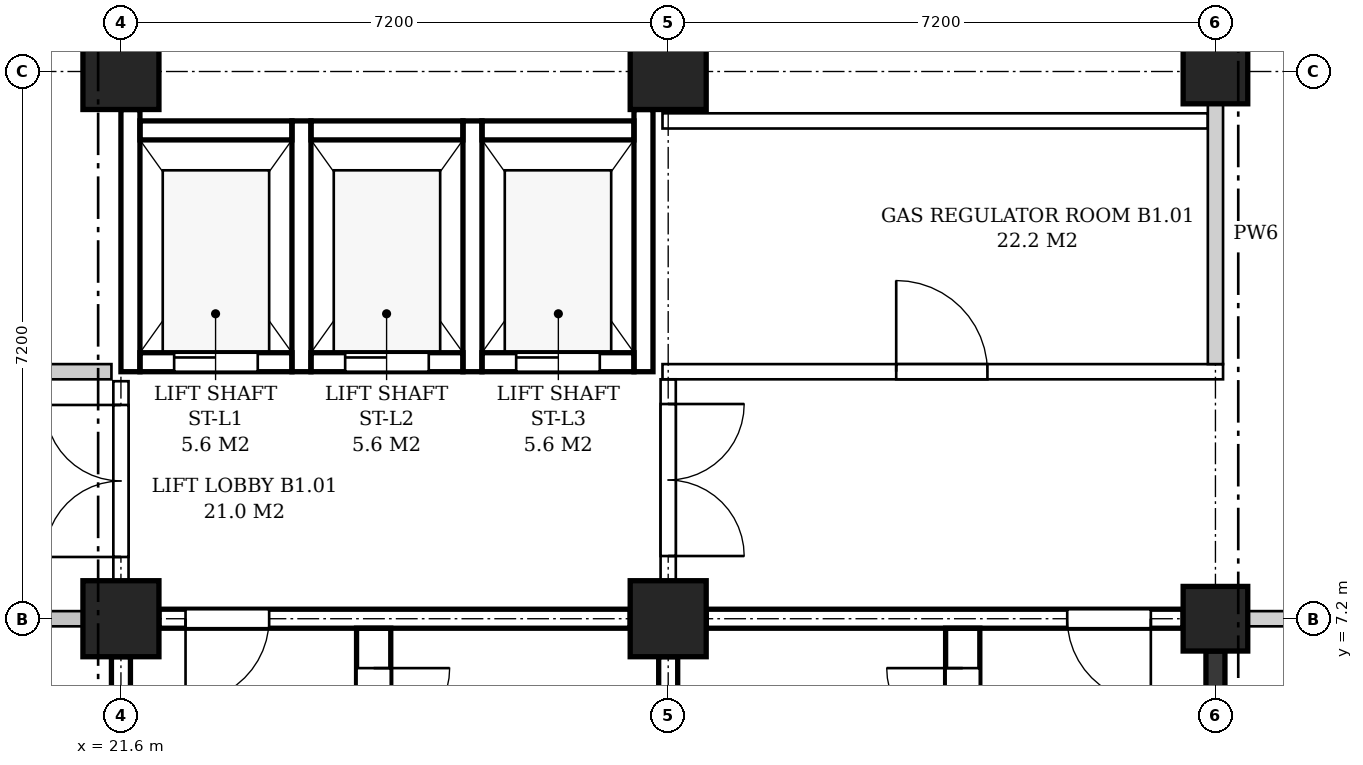
"""IFC4 building model, lengths in metres.
Left out: names, types, materials, properties, quantities, classifications, styles, units other than length and angle.
Written with IfcOpenShell. Run it as: python <this file> out.ifc"""

import sys

from ifc_helpers import new_model, si_unit, direction, frame, frame_2d, origin, origin_2d, place, context, subcontext, project, spatial, polyline, rectangle, outline, extrude, element, fill, save


model = new_model("IFC4")
c1 = context("Model", 3, precision=1e-05, world=origin(), true_north=direction((0.0, 1.0)))
c2 = subcontext(c1, "Body", "Model", "MODEL_VIEW")
j1 = project(units=[si_unit("LENGTHUNIT", "METRE"), si_unit("PLANEANGLEUNIT", "RADIAN")], contexts=[c1])
p1 = place(None, origin())
s1 = spatial("IfcSite", under=j1, at=p1, CompositionType="ELEMENT")
p2 = place(p1, origin())
s2 = spatial("IfcBuilding", under=s1, at=p2, CompositionType="ELEMENT")
p3 = place(p2, frame((0.0, 0.0, -4.5)))
s3 = spatial("IfcBuildingStorey", under=s2, at=p3, CompositionType="ELEMENT", Elevation=-4.5)
for number, where, z_axis, x_axis in (
    (1, (21.6, 7.2, 0.0), (0.0, 0.0, 1.0), (1.0, 0.0, 0.0)),
    (2, (21.6, 14.4, 0.0), (0.0, 0.0, 1.0), (1.0, 0.0, 0.0)),
    (3, (28.8, 7.2, 0.0), (0.0, 0.0, 1.0), (1.0, 0.0, 0.0)),
    (4, (28.8, 14.4, 0.0), (0.0, 0.0, 1.0), (1.0, 0.0, 0.0)),
):
    element("IfcColumn", number, at=place(p3, frame(where, z_axis=z_axis, x_axis=x_axis)), inside=s3, PredefinedType="COLUMN", context=c2, shape_type="SweptSolid", body=[
        extrude(rectangle(XDim=1.0, YDim=1.0, at=origin_2d()), origin(), (0.0, 0.0, 1.0), 4.5),
    ])
for number, where, z_axis, x_axis in (
    (5, (36.0, 7.2, 0.0), (0.0, 0.0, 1.0), (1.0, 0.0, 0.0)),
    (6, (36.0, 14.4, 0.0), (0.0, 0.0, 1.0), (1.0, 0.0, 0.0)),
):
    element("IfcColumn", number, at=place(p3, frame(where, z_axis=z_axis, x_axis=x_axis)), inside=s3, PredefinedType="COLUMN", context=c2, shape_type="SweptSolid", body=[
        extrude(rectangle(XDim=0.85, YDim=0.85, at=origin_2d()), origin(), (0.0, 0.0, 1.0), 4.5),
    ])
p4 = place(p3, frame((29.3, 7.2, 0.0), z_axis=(0.0, 0.0, 1.0), x_axis=(1.0, 0.0, 0.0)))
e7 = element("IfcWall", 7, at=p4, inside=s3, PredefinedType="SHEAR", context=c2, shape_type="SweptSolid", body=[
    extrude(rectangle(XDim=6.275, YDim=0.25, at=frame_2d((3.137, 0.0))), origin(), (0.0, 0.0, 1.0), 3.4),
])
p5 = place(p4, frame((4.75, 0.0, 0.0)))
e8 = element("IfcOpeningElement", 8, at=p5, cuts=e7, PredefinedType="OPENING", context=c2, shape_type="SweptSolid", body=[
    extrude(rectangle(XDim=1.1, YDim=2.1, at=frame_2d((0.55, 1.05))), frame((0.0, 0.135, 0.0), z_axis=(0.0, -1.0, 0.0), x_axis=(1.0, 0.0, 0.0)), (0.0, 0.0, 1.0), 0.27),
])
p6 = place(p3, frame((28.8, 0.5, 0.0), z_axis=(0.0, 0.0, 1.0), x_axis=(0.0, 1.0, 0.0)))
e9 = element("IfcWall", 9, at=p6, inside=s3, PredefinedType="SHEAR", context=c2, shape_type="SweptSolid", body=[
    extrude(rectangle(XDim=6.2, YDim=0.25, at=frame_2d((3.1, 0.0))), origin(), (0.0, 0.0, 1.0), 3.4),
])
p7 = place(p3, frame((36.0, 0.425, 0.0), z_axis=(0.0, 0.0, 1.0), x_axis=(0.0, 1.0, 0.0)))
e10 = element("IfcWall", 10, at=p7, inside=s3, PredefinedType="SHEAR", context=c2, shape_type="SweptSolid", body=[
    extrude(rectangle(XDim=6.35, YDim=0.25, at=frame_2d((3.175, 0.0))), origin(), (0.0, 0.0, 1.0), 3.4),
])
p8 = place(p3, frame((32.675, 0.2, 0.0), z_axis=(0.0, 0.0, 1.0), x_axis=(0.0, 1.0, 0.0)))
e11 = element("IfcWall", 11, at=p8, inside=s3, PredefinedType="SHEAR", context=c2, shape_type="SweptSolid", body=[
    extrude(rectangle(XDim=6.875, YDim=0.45, at=frame_2d((3.438, 0.0))), origin(), (0.0, 0.0, 1.0), 4.2),
])
p9 = place(p8, frame((5.35, 0.0, 0.0)))
e12 = element("IfcOpeningElement", 12, at=p9, cuts=e11, PredefinedType="OPENING", context=c2, shape_type="SweptSolid", body=[
    extrude(rectangle(XDim=1.0, YDim=2.1, at=frame_2d((0.5, 1.05))), frame((0.0, 0.235, 0.0), z_axis=(0.0, -1.0, 0.0), x_axis=(1.0, 0.0, 0.0)), (0.0, 0.0, 1.0), 0.47),
])
p10 = place(p3, frame((22.1, 7.2, 0.0), z_axis=(0.0, 0.0, 1.0), x_axis=(1.0, 0.0, 0.0)))
e13 = element("IfcWall", 13, at=p10, inside=s3, PredefinedType="SHEAR", context=c2, shape_type="SweptSolid", body=[
    extrude(rectangle(XDim=6.2, YDim=0.25, at=frame_2d((3.1, 0.0))), origin(), (0.0, 0.0, 1.0), 3.4),
])
p11 = place(p10, frame((0.35, 0.0, 0.0)))
e14 = element("IfcOpeningElement", 14, at=p11, cuts=e13, PredefinedType="OPENING", context=c2, shape_type="SweptSolid", body=[
    extrude(rectangle(XDim=1.1, YDim=2.1, at=frame_2d((0.55, 1.05))), frame((0.0, 0.135, 0.0), z_axis=(0.0, -1.0, 0.0), x_axis=(1.0, 0.0, 0.0)), (0.0, 0.0, 1.0), 0.27),
])
p12 = place(p3, frame((21.6, 0.5, 0.0), z_axis=(0.0, 0.0, 1.0), x_axis=(0.0, 1.0, 0.0)))
e15 = element("IfcWall", 15, at=p12, inside=s3, PredefinedType="SHEAR", context=c2, shape_type="SweptSolid", body=[
    extrude(rectangle(XDim=6.2, YDim=0.25, at=frame_2d((3.1, 0.0))), origin(), (0.0, 0.0, 1.0), 3.4),
])
p13 = place(p3, frame((24.925, 0.2, 0.0), z_axis=(0.0, 0.0, 1.0), x_axis=(0.0, 1.0, 0.0)))
e16 = element("IfcWall", 16, at=p13, inside=s3, PredefinedType="SHEAR", context=c2, shape_type="SweptSolid", body=[
    extrude(rectangle(XDim=6.875, YDim=0.45, at=frame_2d((3.438, 0.0))), origin(), (0.0, 0.0, 1.0), 4.2),
])
p14 = place(p13, frame((5.35, 0.0, 0.0)))
e17 = element("IfcOpeningElement", 17, at=p14, cuts=e16, PredefinedType="OPENING", context=c2, shape_type="SweptSolid", body=[
    extrude(rectangle(XDim=1.0, YDim=2.1, at=frame_2d((0.5, 1.05))), frame((0.0, 0.235, 0.0), z_axis=(0.0, -1.0, 0.0), x_axis=(1.0, 0.0, 0.0)), (0.0, 0.0, 1.0), 0.47),
])
p15 = place(p3, frame((21.725, 10.45, -1.6), z_axis=(0.0, 0.0, 1.0), x_axis=(0.0, 1.0, 0.0)))
e18 = element("IfcWall", 18, at=p15, inside=s3, PredefinedType="SHEAR", context=c2, shape_type="SweptSolid", body=[
    extrude(rectangle(XDim=3.45, YDim=0.25, at=frame_2d((1.725, 0.0))), origin(), (0.0, 0.0, 1.0), 5.0),
])
for number, where, z_axis, x_axis in (
    (19, (23.975, 10.45, -1.6), (0.0, 0.0, 1.0), (0.0, 1.0, 0.0)),
    (20, (26.225, 10.45, -1.6), (0.0, 0.0, 1.0), (0.0, 1.0, 0.0)),
):
    element("IfcWall", number, at=place(p3, frame(where, z_axis=z_axis, x_axis=x_axis)), inside=s3, PredefinedType="SHEAR", context=c2, shape_type="SweptSolid", body=[
        extrude(rectangle(XDim=3.3, YDim=0.25, at=frame_2d((1.65, 0.0))), origin(), (0.0, 0.0, 1.0), 5.8),
    ])
p16 = place(p3, frame((28.475, 10.45, -1.6), z_axis=(0.0, 0.0, 1.0), x_axis=(0.0, 1.0, 0.0)))
e21 = element("IfcWall", 21, at=p16, inside=s3, PredefinedType="SHEAR", context=c2, shape_type="SweptSolid", body=[
    extrude(rectangle(XDim=3.45, YDim=0.25, at=frame_2d((1.725, 0.0))), origin(), (0.0, 0.0, 1.0), 5.8),
])
p17 = place(p3, frame((21.85, 10.575, 0.0), z_axis=(0.0, 0.0, 1.0), x_axis=(1.0, 0.0, 0.0)))
e22 = element("IfcWall", 22, at=p17, inside=s3, PredefinedType="SHEAR", context=c2, shape_type="SweptSolid", body=[
    extrude(rectangle(XDim=2.0, YDim=0.25, at=frame_2d((1.0, 0.0))), origin(), (0.0, 0.0, 1.0), 4.2),
])
p18 = place(p17, frame((0.45, 0.0, 0.0)))
e23 = element("IfcOpeningElement", 23, at=p18, cuts=e22, PredefinedType="OPENING", context=c2, shape_type="SweptSolid", body=[
    extrude(rectangle(XDim=1.1, YDim=2.1, at=frame_2d((0.55, 1.05))), frame((0.0, 0.135, 0.0), z_axis=(0.0, -1.0, 0.0), x_axis=(1.0, 0.0, 0.0)), (0.0, 0.0, 1.0), 0.27),
])
p19 = place(p3, frame((21.85, 13.625, -1.6), z_axis=(0.0, 0.0, 1.0), x_axis=(1.0, 0.0, 0.0)))
e24 = element("IfcWall", 24, at=p19, inside=s3, PredefinedType="SHEAR", context=c2, shape_type="SweptSolid", body=[
    extrude(rectangle(XDim=2.0, YDim=0.25, at=frame_2d((1.0, 0.0))), origin(), (0.0, 0.0, 1.0), 5.8),
])
p20 = place(p3, frame((24.1, 10.575, 0.0), z_axis=(0.0, 0.0, 1.0), x_axis=(1.0, 0.0, 0.0)))
e25 = element("IfcWall", 25, at=p20, inside=s3, PredefinedType="SHEAR", context=c2, shape_type="SweptSolid", body=[
    extrude(rectangle(XDim=2.0, YDim=0.25, at=frame_2d((1.0, 0.0))), origin(), (0.0, 0.0, 1.0), 4.2),
])
p21 = place(p20, frame((0.45, 0.0, 0.0)))
e26 = element("IfcOpeningElement", 26, at=p21, cuts=e25, PredefinedType="OPENING", context=c2, shape_type="SweptSolid", body=[
    extrude(rectangle(XDim=1.1, YDim=2.1, at=frame_2d((0.55, 1.05))), frame((0.0, 0.135, 0.0), z_axis=(0.0, -1.0, 0.0), x_axis=(1.0, 0.0, 0.0)), (0.0, 0.0, 1.0), 0.27),
])
p22 = place(p3, frame((24.1, 13.625, -1.6), z_axis=(0.0, 0.0, 1.0), x_axis=(1.0, 0.0, 0.0)))
e27 = element("IfcWall", 27, at=p22, inside=s3, PredefinedType="SHEAR", context=c2, shape_type="SweptSolid", body=[
    extrude(rectangle(XDim=2.0, YDim=0.25, at=frame_2d((1.0, 0.0))), origin(), (0.0, 0.0, 1.0), 5.8),
])
p23 = place(p3, frame((26.35, 10.575, 0.0), z_axis=(0.0, 0.0, 1.0), x_axis=(1.0, 0.0, 0.0)))
e28 = element("IfcWall", 28, at=p23, inside=s3, PredefinedType="SHEAR", context=c2, shape_type="SweptSolid", body=[
    extrude(rectangle(XDim=2.0, YDim=0.25, at=frame_2d((1.0, 0.0))), origin(), (0.0, 0.0, 1.0), 4.2),
])
p24 = place(p23, frame((0.45, 0.0, 0.0)))
e29 = element("IfcOpeningElement", 29, at=p24, cuts=e28, PredefinedType="OPENING", context=c2, shape_type="SweptSolid", body=[
    extrude(rectangle(XDim=1.1, YDim=2.1, at=frame_2d((0.55, 1.05))), frame((0.0, 0.135, 0.0), z_axis=(0.0, -1.0, 0.0), x_axis=(1.0, 0.0, 0.0)), (0.0, 0.0, 1.0), 0.27),
])
p25 = place(p3, frame((26.35, 13.625, -1.6), z_axis=(0.0, 0.0, 1.0), x_axis=(1.0, 0.0, 0.0)))
e30 = element("IfcWall", 30, at=p25, inside=s3, PredefinedType="SHEAR", context=c2, shape_type="SweptSolid", body=[
    extrude(rectangle(XDim=2.0, YDim=0.25, at=frame_2d((1.0, 0.0))), origin(), (0.0, 0.0, 1.0), 5.8),
])
p26 = place(p3, frame((14.9, 7.2, 0.0), z_axis=(0.0, 0.0, 1.0), x_axis=(1.0, 0.0, 0.0)))
e31 = element("IfcWall", 31, at=p26, inside=s3, PredefinedType="PARTITIONING", context=c2, shape_type="SweptSolid", body=[
    extrude(rectangle(XDim=6.2, YDim=0.2, at=frame_2d((3.1, 0.0))), origin(), (0.0, 0.0, 1.0), 3.4),
])
p27 = place(p26, frame((2.6, 0.0, 0.0)))
e32 = element("IfcOpeningElement", 32, at=p27, cuts=e31, PredefinedType="OPENING", context=c2, shape_type="SweptSolid", body=[
    extrude(rectangle(XDim=1.0, YDim=2.1, at=frame_2d((0.5, 1.05))), frame((0.0, 0.11, 0.0), z_axis=(0.0, -1.0, 0.0), x_axis=(1.0, 0.0, 0.0)), (0.0, 0.0, 1.0), 0.22),
])
p28 = place(p3, frame((36.425, 7.2, 0.0), z_axis=(0.0, 0.0, 1.0), x_axis=(1.0, 0.0, 0.0)))
e33 = element("IfcWall", 33, at=p28, inside=s3, PredefinedType="PARTITIONING", context=c2, shape_type="SweptSolid", body=[
    extrude(rectangle(XDim=6.35, YDim=0.2, at=frame_2d((3.175, 0.0))), origin(), (0.0, 0.0, 1.0), 3.4),
])
p29 = place(p3, frame((14.4, 10.45, 0.0), z_axis=(0.0, 0.0, 1.0), x_axis=(1.0, 0.0, 0.0)))
e34 = element("IfcWall", 34, at=p29, inside=s3, PredefinedType="SOLIDWALL", context=c2, shape_type="SweptSolid", body=[
    extrude(outline(polyline([(0.0, 0.0), (7.075, 0.0), (7.075, 3.4), (6.9, 3.4), (6.9, 4.2), (0.3, 4.2), (0.3, 3.4), (0.0, 3.4), (0.0, 0.0)])), frame((0.0, 0.1, 0.0), z_axis=(0.0, -1.0, 0.0), x_axis=(1.0, 0.0, 0.0)), (0.0, 0.0, 1.0), 0.2),
])
p30 = place(p29, frame((3.088, 0.0, 0.0)))
e35 = element("IfcOpeningElement", 35, at=p30, cuts=e34, PredefinedType="OPENING", context=c2, shape_type="SweptSolid", body=[
    extrude(rectangle(XDim=0.9, YDim=2.1, at=frame_2d((0.45, 1.05))), frame((0.0, 0.11, 0.0), z_axis=(0.0, -1.0, 0.0), x_axis=(1.0, 0.0, 0.0)), (0.0, 0.0, 1.0), 0.22),
])
p31 = place(p3, frame((28.725, 10.45, 0.0), z_axis=(0.0, 0.0, 1.0), x_axis=(1.0, 0.0, 0.0)))
e36 = element("IfcWall", 36, at=p31, inside=s3, PredefinedType="PARTITIONING", context=c2, shape_type="SweptSolid", body=[
    extrude(outline(polyline([(0.0, 0.0), (7.375, 0.0), (7.375, 3.4), (6.975, 3.4), (6.975, 4.2), (0.375, 4.2), (0.375, 3.4), (0.0, 3.4), (0.0, 0.0)])), frame((0.0, 0.1, 0.0), z_axis=(0.0, -1.0, 0.0), x_axis=(1.0, 0.0, 0.0)), (0.0, 0.0, 1.0), 0.2),
])
p32 = place(p31, frame((3.075, 0.0, 0.0)))
e37 = element("IfcOpeningElement", 37, at=p32, cuts=e36, PredefinedType="OPENING", context=c2, shape_type="SweptSolid", body=[
    extrude(rectangle(XDim=1.2, YDim=2.1, at=frame_2d((0.6, 1.05))), frame((0.0, 0.11, 0.0), z_axis=(0.0, -1.0, 0.0), x_axis=(1.0, 0.0, 0.0)), (0.0, 0.0, 1.0), 0.22),
])
p33 = place(p3, frame((28.725, 13.75, 0.0), z_axis=(0.0, 0.0, 1.0), x_axis=(1.0, 0.0, 0.0)))
e38 = element("IfcWall", 38, at=p33, inside=s3, PredefinedType="PARTITIONING", context=c2, shape_type="SweptSolid", body=[
    extrude(outline(polyline([(0.0, 0.0), (7.175, 0.0), (7.175, 3.4), (6.975, 3.4), (6.975, 4.2), (0.375, 4.2), (0.375, 3.4), (0.0, 3.4), (0.0, 0.0)])), frame((0.0, 0.1, 0.0), z_axis=(0.0, -1.0, 0.0), x_axis=(1.0, 0.0, 0.0)), (0.0, 0.0, 1.0), 0.2),
])
p34 = place(p3, frame((21.6, 7.7, 0.0), z_axis=(0.0, 0.0, 1.0), x_axis=(0.0, 1.0, 0.0)))
e39 = element("IfcWall", 39, at=p34, inside=s3, PredefinedType="PARTITIONING", context=c2, shape_type="SweptSolid", body=[
    extrude(rectangle(XDim=2.625, YDim=0.2, at=frame_2d((1.312, 0.0))), origin(), (0.0, 0.0, 1.0), 3.4),
])
p35 = place(p34, frame((0.312, 0.0, 0.0)))
e40 = element("IfcOpeningElement", 40, at=p35, cuts=e39, PredefinedType="OPENING", context=c2, shape_type="SweptSolid", body=[
    extrude(rectangle(XDim=2.0, YDim=2.4, at=frame_2d((1.0, 1.2))), frame((0.0, 0.11, 0.0), z_axis=(0.0, -1.0, 0.0), x_axis=(1.0, 0.0, 0.0)), (0.0, 0.0, 1.0), 0.22),
])
p36 = place(p3, frame((28.8, 7.7, 0.0), z_axis=(0.0, 0.0, 1.0), x_axis=(0.0, 1.0, 0.0)))
e41 = element("IfcWall", 41, at=p36, inside=s3, PredefinedType="PARTITIONING", context=c2, shape_type="SweptSolid", body=[
    extrude(rectangle(XDim=2.65, YDim=0.2, at=frame_2d((1.325, 0.0))), origin(), (0.0, 0.0, 1.0), 3.4),
])
p37 = place(p36, frame((0.325, 0.0, 0.0)))
e42 = element("IfcOpeningElement", 42, at=p37, cuts=e41, PredefinedType="OPENING", context=c2, shape_type="SweptSolid", body=[
    extrude(rectangle(XDim=2.0, YDim=2.4, at=frame_2d((1.0, 1.2))), frame((0.0, 0.11, 0.0), z_axis=(0.0, -1.0, 0.0), x_axis=(1.0, 0.0, 0.0)), (0.0, 0.0, 1.0), 0.22),
])
p38 = place(p3, frame((36.0, 10.55, 0.0), z_axis=(0.0, 0.0, 1.0), x_axis=(0.0, 1.0, 0.0)))
e43 = element("IfcWall", 43, at=p38, inside=s3, PredefinedType="PARTITIONING", context=c2, shape_type="SweptSolid", body=[
    extrude(rectangle(XDim=3.425, YDim=0.2, at=frame_2d((1.712, 0.0))), origin(), (0.0, 0.0, 1.0), 3.4),
])
p39 = place(p9, origin())
e44 = element("IfcDoor", 44, at=p39, inside=s3, OperationType="SINGLE_SWING_RIGHT", PredefinedType="DOOR", context=c2, shape_type="SweptSolid", body=[
    extrude(rectangle(XDim=1.0, YDim=2.1, at=frame_2d((0.5, 1.05))), frame((0.0, 0.025, 0.0), z_axis=(0.0, -1.0, 0.0), x_axis=(1.0, 0.0, 0.0)), (0.0, 0.0, 1.0), 0.05),
])
fill(e12, e44)
p40 = place(p5, frame((1.1, 0.0, 0.0), z_axis=(0.0, 0.0, 1.0), x_axis=(-1.0, 0.0, 0.0)))
e45 = element("IfcDoor", 45, at=p40, inside=s3, OperationType="SINGLE_SWING_LEFT", PredefinedType="DOOR", context=c2, shape_type="SweptSolid", body=[
    extrude(rectangle(XDim=1.1, YDim=2.1, at=frame_2d((0.55, 1.05))), frame((0.0, 0.025, 0.0), z_axis=(0.0, -1.0, 0.0), x_axis=(1.0, 0.0, 0.0)), (0.0, 0.0, 1.0), 0.05),
])
fill(e8, e45)
p41 = place(p14, frame((1.0, 0.0, 0.0), z_axis=(0.0, 0.0, 1.0), x_axis=(-1.0, 0.0, 0.0)))
e46 = element("IfcDoor", 46, at=p41, inside=s3, OperationType="SINGLE_SWING_LEFT", PredefinedType="DOOR", context=c2, shape_type="SweptSolid", body=[
    extrude(rectangle(XDim=1.0, YDim=2.1, at=frame_2d((0.5, 1.05))), frame((0.0, 0.025, 0.0), z_axis=(0.0, -1.0, 0.0), x_axis=(1.0, 0.0, 0.0)), (0.0, 0.0, 1.0), 0.05),
])
fill(e17, e46)
p42 = place(p11, frame((1.1, 0.0, 0.0), z_axis=(0.0, 0.0, 1.0), x_axis=(-1.0, 0.0, 0.0)))
e47 = element("IfcDoor", 47, at=p42, inside=s3, OperationType="SINGLE_SWING_RIGHT", PredefinedType="DOOR", context=c2, shape_type="SweptSolid", body=[
    extrude(rectangle(XDim=1.1, YDim=2.1, at=frame_2d((0.55, 1.05))), frame((0.0, 0.025, 0.0), z_axis=(0.0, -1.0, 0.0), x_axis=(1.0, 0.0, 0.0)), (0.0, 0.0, 1.0), 0.05),
])
fill(e14, e47)
p43 = place(p18, origin())
e48 = element("IfcDoor", 48, at=p43, inside=s3, OperationType="SLIDING_TO_LEFT", PredefinedType="DOOR", context=c2, shape_type="SweptSolid", body=[
    extrude(rectangle(XDim=1.1, YDim=2.1, at=frame_2d((0.55, 1.05))), frame((0.0, 0.025, 0.0), z_axis=(0.0, -1.0, 0.0), x_axis=(1.0, 0.0, 0.0)), (0.0, 0.0, 1.0), 0.05),
])
fill(e23, e48)
p44 = place(p21, origin())
e49 = element("IfcDoor", 49, at=p44, inside=s3, OperationType="SLIDING_TO_LEFT", PredefinedType="DOOR", context=c2, shape_type="SweptSolid", body=[
    extrude(rectangle(XDim=1.1, YDim=2.1, at=frame_2d((0.55, 1.05))), frame((0.0, 0.025, 0.0), z_axis=(0.0, -1.0, 0.0), x_axis=(1.0, 0.0, 0.0)), (0.0, 0.0, 1.0), 0.05),
])
fill(e26, e49)
p45 = place(p24, origin())
e50 = element("IfcDoor", 50, at=p45, inside=s3, OperationType="SLIDING_TO_LEFT", PredefinedType="DOOR", context=c2, shape_type="SweptSolid", body=[
    extrude(rectangle(XDim=1.1, YDim=2.1, at=frame_2d((0.55, 1.05))), frame((0.0, 0.025, 0.0), z_axis=(0.0, -1.0, 0.0), x_axis=(1.0, 0.0, 0.0)), (0.0, 0.0, 1.0), 0.05),
])
fill(e29, e50)
p46 = place(p35, origin())
e51 = element("IfcDoor", 51, at=p46, inside=s3, OperationType="DOUBLE_DOOR_SINGLE_SWING", PredefinedType="DOOR", context=c2, shape_type="SweptSolid", body=[
    extrude(rectangle(XDim=2.0, YDim=2.4, at=frame_2d((1.0, 1.2))), frame((0.0, 0.025, 0.0), z_axis=(0.0, -1.0, 0.0), x_axis=(1.0, 0.0, 0.0)), (0.0, 0.0, 1.0), 0.05),
])
fill(e40, e51)
p47 = place(p37, origin())
e52 = element("IfcDoor", 52, at=p47, inside=s3, OperationType="DOUBLE_DOOR_SINGLE_SWING", PredefinedType="DOOR", context=c2, shape_type="SweptSolid", body=[
    extrude(rectangle(XDim=2.0, YDim=2.4, at=frame_2d((1.0, 1.2))), frame((0.0, 0.025, 0.0), z_axis=(0.0, -1.0, 0.0), x_axis=(1.0, 0.0, 0.0)), (0.0, 0.0, 1.0), 0.05),
])
fill(e42, e52)
p48 = place(p32, origin())
e53 = element("IfcDoor", 53, at=p48, inside=s3, OperationType="SINGLE_SWING_LEFT", PredefinedType="DOOR", context=c2, shape_type="SweptSolid", body=[
    extrude(rectangle(XDim=1.2, YDim=2.1, at=frame_2d((0.6, 1.05))), frame((0.0, 0.025, 0.0), z_axis=(0.0, -1.0, 0.0), x_axis=(1.0, 0.0, 0.0)), (0.0, 0.0, 1.0), 0.05),
])
fill(e37, e53)
save(model, sys.argv[1])
